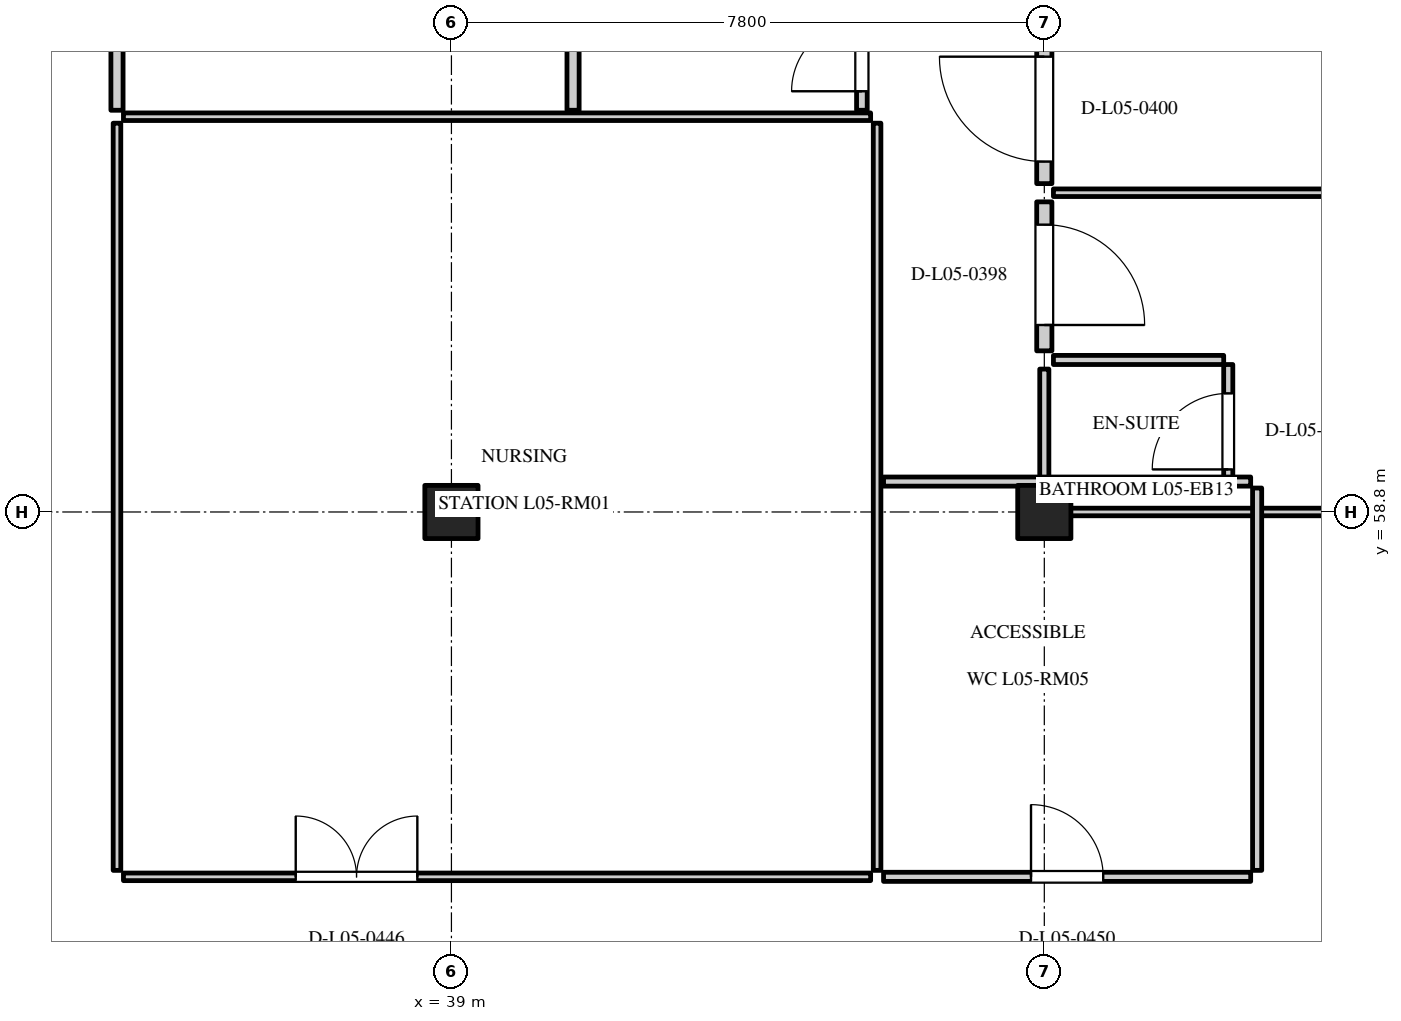
"""IFC4 building model, lengths in metres.
Left out: names, types, materials, properties, quantities, classifications, styles, units other than length and angle.
Written with IfcOpenShell. Run it as: python <this file> out.ifc"""

import sys

from ifc_helpers import new_model, si_unit, direction, frame, frame_2d, origin, origin_2d, place, context, subcontext, project, spatial, rectangle, extrude, element, fill, save


model = new_model("IFC4")
c1 = context("Model", 3, precision=1e-05, world=origin(), true_north=direction((0.0, 1.0)))
c2 = subcontext(c1, "Body", "Model", "MODEL_VIEW")
j1 = project(units=[si_unit("LENGTHUNIT", "METRE"), si_unit("PLANEANGLEUNIT", "RADIAN")], contexts=[c1])
p1 = place(None, origin())
s1 = spatial("IfcSite", under=j1, at=p1, CompositionType="ELEMENT")
p2 = place(p1, origin())
s2 = spatial("IfcBuilding", under=s1, at=p2, CompositionType="ELEMENT")
p3 = place(p2, frame((0.0, 0.0, 22.2)))
s3 = spatial("IfcBuildingStorey", under=s2, at=p3, CompositionType="ELEMENT", Elevation=22.2)
for number, where, z_axis, x_axis in (
    (1, (39.0, 58.8, 0.0), (0.0, 0.0, 1.0), (1.0, 0.0, 0.0)),
    (2, (46.8, 58.8, 0.0), (0.0, 0.0, 1.0), (1.0, 0.0, 0.0)),
):
    element("IfcColumn", number, at=place(p3, frame(where, z_axis=z_axis, x_axis=x_axis)), inside=s3, PredefinedType="COLUMN", context=c2, shape_type="SweptSolid", body=[
        extrude(rectangle(XDim=0.7, YDim=0.7, at=origin_2d()), origin(), (0.0, 0.0, 1.0), 3.9),
    ])
p4 = place(p3, frame((46.92, 58.8, 0.0), z_axis=(0.0, 0.0, 1.0), x_axis=(1.0, 0.0, 0.0)))
e3 = element("IfcWall", 3, at=p4, inside=s3, PredefinedType="PARTITIONING", context=c2, shape_type="SweptSolid", body=[
    extrude(rectangle(XDim=7.56, YDim=0.1, at=frame_2d((3.78, 0.0))), origin(), (0.0, 0.0, 1.0), 2.95),
])
p5 = place(p3, frame((46.92, 63.0, 0.0), z_axis=(0.0, 0.0, 1.0), x_axis=(1.0, 0.0, 0.0)))
e4 = element("IfcWall", 4, at=p5, inside=s3, PredefinedType="PARTITIONING", context=c2, shape_type="SweptSolid", body=[
    extrude(rectangle(XDim=7.56, YDim=0.1, at=frame_2d((3.78, 0.0))), origin(), (0.0, 0.0, 1.0), 3.58),
])
p6 = place(p3, frame((46.8, 60.92, 0.0), z_axis=(0.0, 0.0, 1.0), x_axis=(0.0, 1.0, 0.0)))
e5 = element("IfcWall", 5, at=p6, inside=s3, PredefinedType="STANDARD", context=c2, shape_type="SweptSolid", body=[
    extrude(rectangle(XDim=1.96, YDim=0.2, at=frame_2d((0.98, 0.0))), origin(), (0.0, 0.0, 1.0), 3.58),
])
p7 = place(p6, frame((0.34, 0.0, 0.0)))
e6 = element("IfcOpeningElement", 6, at=p7, cuts=e5, PredefinedType="OPENING", context=c2, shape_type="SweptSolid", body=[
    extrude(rectangle(XDim=1.32, YDim=2.2, at=frame_2d((0.66, 1.1))), frame((0.0, 0.112, 0.0), z_axis=(0.0, -1.0, 0.0), x_axis=(1.0, 0.0, 0.0)), (0.0, 0.0, 1.0), 0.224),
])
p8 = place(p3, frame((46.8, 58.92, 0.0), z_axis=(0.0, 0.0, 1.0), x_axis=(0.0, 1.0, 0.0)))
e7 = element("IfcWall", 7, at=p8, inside=s3, PredefinedType="PARTITIONING", context=c2, shape_type="SweptSolid", body=[
    extrude(rectangle(XDim=1.76, YDim=0.12, at=frame_2d((0.88, 0.0))), origin(), (0.0, 0.0, 1.0), 3.58),
])
p9 = place(p3, frame((46.92, 60.8, 0.0), z_axis=(0.0, 0.0, 1.0), x_axis=(1.0, 0.0, 0.0)))
e8 = element("IfcWall", 8, at=p9, inside=s3, PredefinedType="PARTITIONING", context=c2, shape_type="SweptSolid", body=[
    extrude(rectangle(XDim=2.24, YDim=0.12, at=frame_2d((1.12, 0.0))), origin(), (0.0, 0.0, 1.0), 3.58),
])
p10 = place(p3, frame((49.22, 58.98, 0.0), z_axis=(0.0, 0.0, 1.0), x_axis=(0.0, 1.0, 0.0)))
e9 = element("IfcWall", 9, at=p10, inside=s3, PredefinedType="PARTITIONING", context=c2, shape_type="SweptSolid", body=[
    extrude(rectangle(XDim=1.76, YDim=0.12, at=frame_2d((0.88, 0.0))), origin(), (0.0, 0.0, 1.0), 3.58),
])
p11 = place(p10, frame((0.38, 0.0, 0.0)))
e10 = element("IfcOpeningElement", 10, at=p11, cuts=e9, PredefinedType="OPENING", context=c2, shape_type="SweptSolid", body=[
    extrude(rectangle(XDim=1.0, YDim=2.1, at=frame_2d((0.5, 1.05))), frame((0.0, 0.072, 0.0), z_axis=(0.0, -1.0, 0.0), x_axis=(1.0, 0.0, 0.0)), (0.0, 0.0, 1.0), 0.144),
])
p12 = place(p3, frame((46.8, 63.12, 0.0), z_axis=(0.0, 0.0, 1.0), x_axis=(0.0, 1.0, 0.0)))
e11 = element("IfcWall", 11, at=p12, inside=s3, PredefinedType="STANDARD", context=c2, shape_type="SweptSolid", body=[
    extrude(rectangle(XDim=1.96, YDim=0.2, at=frame_2d((0.98, 0.0))), origin(), (0.0, 0.0, 1.0), 3.58),
])
p13 = place(p12, frame((0.29, 0.0, 0.0)))
e12 = element("IfcOpeningElement", 12, at=p13, cuts=e11, PredefinedType="OPENING", context=c2, shape_type="SweptSolid", body=[
    extrude(rectangle(XDim=1.38, YDim=2.2, at=frame_2d((0.69, 1.1))), frame((0.0, 0.112, 0.0), z_axis=(0.0, -1.0, 0.0), x_axis=(1.0, 0.0, 0.0)), (0.0, 0.0, 1.0), 0.224),
])
p14 = place(p3, frame((34.685, 54.0, 0.0), z_axis=(0.0, 0.0, 1.0), x_axis=(1.0, 0.0, 0.0)))
e13 = element("IfcWall", 13, at=p14, inside=s3, PredefinedType="PARTITIONING", context=c2, shape_type="SweptSolid", body=[
    extrude(rectangle(XDim=9.83, YDim=0.1, at=frame_2d((4.915, 0.0))), origin(), (0.0, 0.0, 1.0), 3.58),
])
p15 = place(p14, frame((2.267, 0.0, 0.0)))
e14 = element("IfcOpeningElement", 14, at=p15, cuts=e13, PredefinedType="OPENING", context=c2, shape_type="SweptSolid", body=[
    extrude(rectangle(XDim=1.6, YDim=2.25, at=frame_2d((0.8, 1.125))), frame((0.0, 0.062, 0.0), z_axis=(0.0, -1.0, 0.0), x_axis=(1.0, 0.0, 0.0)), (0.0, 0.0, 1.0), 0.124),
])
p16 = place(p3, frame((34.685, 64.0, 0.0), z_axis=(0.0, 0.0, 1.0), x_axis=(1.0, 0.0, 0.0)))
e15 = element("IfcWall", 15, at=p16, inside=s3, PredefinedType="PARTITIONING", context=c2, shape_type="SweptSolid", body=[
    extrude(rectangle(XDim=9.83, YDim=0.1, at=frame_2d((4.915, 0.0))), origin(), (0.0, 0.0, 1.0), 3.58),
])
for number, where, z_axis, x_axis in (
    (16, (34.6, 54.085, 0.0), (0.0, 0.0, 1.0), (0.0, 1.0, 0.0)),
    (17, (44.6, 54.085, 0.0), (0.0, 0.0, 1.0), (0.0, 1.0, 0.0)),
):
    element("IfcWall", number, at=place(p3, frame(where, z_axis=z_axis, x_axis=x_axis)), inside=s3, PredefinedType="PARTITIONING", context=c2, shape_type="SweptSolid", body=[
        extrude(rectangle(XDim=9.83, YDim=0.1, at=frame_2d((4.915, 0.0))), origin(), (0.0, 0.0, 1.0), 3.58),
    ])
for number, where, z_axis, x_axis in (
    (18, (34.6, 64.085, 0.0), (0.0, 0.0, 1.0), (0.0, 1.0, 0.0)),
    (19, (40.6, 64.085, 0.0), (0.0, 0.0, 1.0), (0.0, 1.0, 0.0)),
):
    element("IfcWall", number, at=place(p3, frame(where, z_axis=z_axis, x_axis=x_axis)), inside=s3, PredefinedType="PARTITIONING", context=c2, shape_type="SweptSolid", body=[
        extrude(rectangle(XDim=7.63, YDim=0.16, at=frame_2d((3.815, 0.0))), origin(), (0.0, 0.0, 1.0), 3.58),
    ])
p17 = place(p3, frame((44.4, 64.085, 0.0), z_axis=(0.0, 0.0, 1.0), x_axis=(0.0, 1.0, 0.0)))
e20 = element("IfcWall", 20, at=p17, inside=s3, PredefinedType="PARTITIONING", context=c2, shape_type="SweptSolid", body=[
    extrude(rectangle(XDim=7.63, YDim=0.14, at=frame_2d((3.815, 0.0))), origin(), (0.0, 0.0, 1.0), 3.58),
])
p18 = place(p17, frame((0.25, 0.0, 0.0)))
e21 = element("IfcOpeningElement", 21, at=p18, cuts=e20, PredefinedType="OPENING", context=c2, shape_type="SweptSolid", body=[
    extrude(rectangle(XDim=1.85, YDim=2.3, at=frame_2d((0.925, 1.15))), frame((0.0, 0.082, 0.0), z_axis=(0.0, -1.0, 0.0), x_axis=(1.0, 0.0, 0.0)), (0.0, 0.0, 1.0), 0.164),
])
p19 = place(p3, frame((44.685, 54.0, 0.0), z_axis=(0.0, 0.0, 1.0), x_axis=(1.0, 0.0, 0.0)))
e22 = element("IfcWall", 22, at=p19, inside=s3, PredefinedType="PARTITIONING", context=c2, shape_type="SweptSolid", body=[
    extrude(rectangle(XDim=4.83, YDim=0.12, at=frame_2d((2.415, 0.0))), origin(), (0.0, 0.0, 1.0), 3.58),
])
p20 = place(p19, frame((1.94, 0.0, 0.0)))
e23 = element("IfcOpeningElement", 23, at=p20, cuts=e22, PredefinedType="OPENING", context=c2, shape_type="SweptSolid", body=[
    extrude(rectangle(XDim=0.95, YDim=2.1, at=frame_2d((0.475, 1.05))), frame((0.0, 0.072, 0.0), z_axis=(0.0, -1.0, 0.0), x_axis=(1.0, 0.0, 0.0)), (0.0, 0.0, 1.0), 0.144),
])
p21 = place(p3, frame((44.685, 59.2, 0.0), z_axis=(0.0, 0.0, 1.0), x_axis=(1.0, 0.0, 0.0)))
e24 = element("IfcWall", 24, at=p21, inside=s3, PredefinedType="PARTITIONING", context=c2, shape_type="SweptSolid", body=[
    extrude(rectangle(XDim=4.83, YDim=0.12, at=frame_2d((2.415, 0.0))), origin(), (0.0, 0.0, 1.0), 3.58),
])
p22 = place(p3, frame((49.6, 54.085, 0.0), z_axis=(0.0, 0.0, 1.0), x_axis=(0.0, 1.0, 0.0)))
e25 = element("IfcWall", 25, at=p22, inside=s3, PredefinedType="PARTITIONING", context=c2, shape_type="SweptSolid", body=[
    extrude(rectangle(XDim=5.03, YDim=0.12, at=frame_2d((2.515, 0.0))), origin(), (0.0, 0.0, 1.0), 3.58),
])
p23 = place(p7, frame((1.32, 0.0, 0.0), z_axis=(0.0, 0.0, 1.0), x_axis=(-1.0, 0.0, 0.0)))
e26 = element("IfcDoor", 26, at=p23, inside=s3, OperationType="SINGLE_SWING_RIGHT", PredefinedType="DOOR", context=c2, shape_type="SweptSolid", body=[
    extrude(rectangle(XDim=1.32, YDim=2.2, at=frame_2d((0.66, 1.1))), frame((0.0, 0.025, 0.0), z_axis=(0.0, -1.0, 0.0), x_axis=(1.0, 0.0, 0.0)), (0.0, 0.0, 1.0), 0.05),
])
fill(e6, e26)
p24 = place(p11, origin())
e27 = element("IfcDoor", 27, at=p24, inside=s3, OperationType="SINGLE_SWING_LEFT", PredefinedType="DOOR", context=c2, shape_type="SweptSolid", body=[
    extrude(rectangle(XDim=1.0, YDim=2.1, at=frame_2d((0.5, 1.05))), frame((0.0, 0.025, 0.0), z_axis=(0.0, -1.0, 0.0), x_axis=(1.0, 0.0, 0.0)), (0.0, 0.0, 1.0), 0.05),
])
fill(e10, e27)
p25 = place(p13, frame((1.38, 0.0, 0.0), z_axis=(0.0, 0.0, 1.0), x_axis=(-1.0, 0.0, 0.0)))
e28 = element("IfcDoor", 28, at=p25, inside=s3, OperationType="SINGLE_SWING_LEFT", PredefinedType="DOOR", context=c2, shape_type="SweptSolid", body=[
    extrude(rectangle(XDim=1.38, YDim=2.2, at=frame_2d((0.69, 1.1))), frame((0.0, 0.025, 0.0), z_axis=(0.0, -1.0, 0.0), x_axis=(1.0, 0.0, 0.0)), (0.0, 0.0, 1.0), 0.05),
])
fill(e12, e28)
p26 = place(p15, origin())
e29 = element("IfcDoor", 29, at=p26, inside=s3, OperationType="DOUBLE_DOOR_SINGLE_SWING", PredefinedType="DOOR", context=c2, shape_type="SweptSolid", body=[
    extrude(rectangle(XDim=1.6, YDim=2.25, at=frame_2d((0.8, 1.125))), frame((0.0, 0.025, 0.0), z_axis=(0.0, -1.0, 0.0), x_axis=(1.0, 0.0, 0.0)), (0.0, 0.0, 1.0), 0.05),
])
fill(e14, e29)
p27 = place(p18, origin())
e30 = element("IfcDoor", 30, at=p27, inside=s3, OperationType="DOUBLE_DOOR_SINGLE_SWING", PredefinedType="DOOR", context=c2, shape_type="SweptSolid", body=[
    extrude(rectangle(XDim=1.85, YDim=2.3, at=frame_2d((0.925, 1.15))), frame((0.0, 0.025, 0.0), z_axis=(0.0, -1.0, 0.0), x_axis=(1.0, 0.0, 0.0)), (0.0, 0.0, 1.0), 0.05),
])
fill(e21, e30)
p28 = place(p20, origin())
e31 = element("IfcDoor", 31, at=p28, inside=s3, OperationType="SINGLE_SWING_LEFT", PredefinedType="DOOR", context=c2, shape_type="SweptSolid", body=[
    extrude(rectangle(XDim=0.95, YDim=2.1, at=frame_2d((0.475, 1.05))), frame((0.0, 0.025, 0.0), z_axis=(0.0, -1.0, 0.0), x_axis=(1.0, 0.0, 0.0)), (0.0, 0.0, 1.0), 0.05),
])
fill(e23, e31)
save(model, sys.argv[1])
